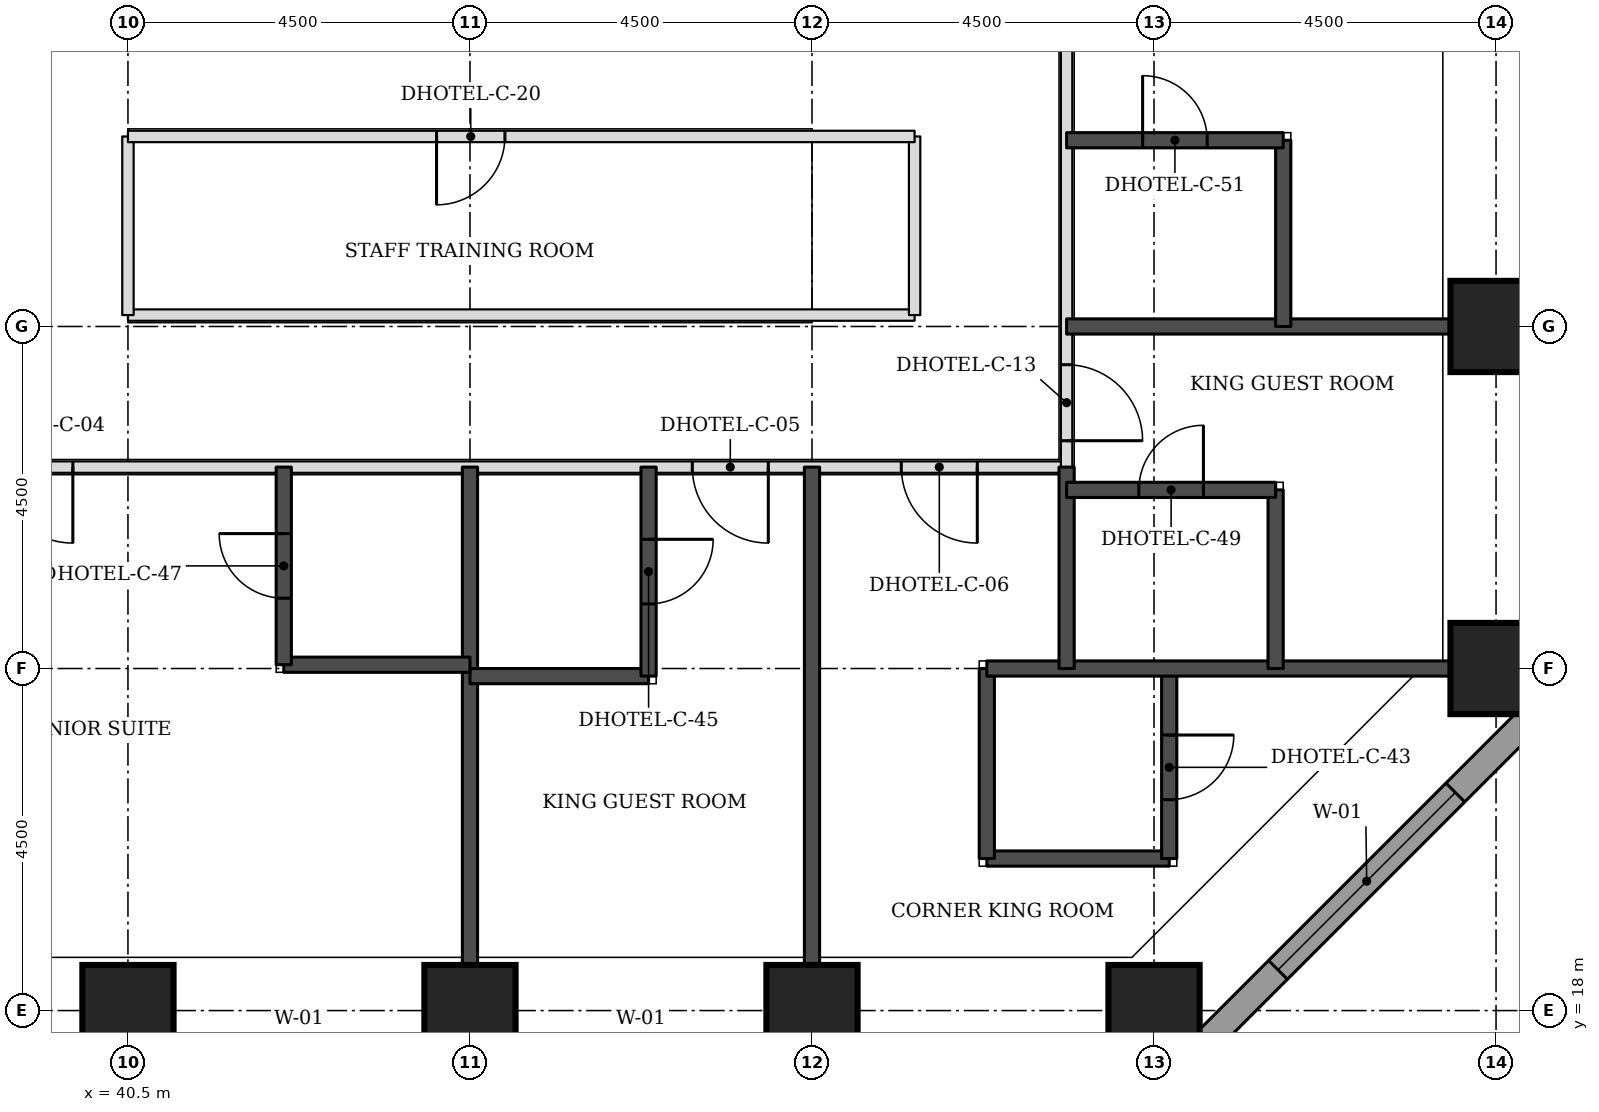
"""IFC4 building model, lengths in metres.
Left out: names, types, materials, properties, quantities, classifications, styles, units other than length and angle.
Written with IfcOpenShell. Run it as: python <this file> out.ifc"""

import sys

from ifc_helpers import new_model, si_unit, direction, frame, frame_2d, origin, origin_2d, place, context, subcontext, project, spatial, rectangle, extrude, element, fill, save


model = new_model("IFC4")
c1 = context("Model", 3, precision=1e-05, world=origin(), true_north=direction((0.0, 1.0)))
c2 = subcontext(c1, "Body", "Model", "MODEL_VIEW")
j1 = project(units=[si_unit("LENGTHUNIT", "METRE"), si_unit("PLANEANGLEUNIT", "RADIAN")], contexts=[c1])
p1 = place(None, origin())
s1 = spatial("IfcSite", under=j1, at=p1, CompositionType="ELEMENT")
p2 = place(p1, origin())
s2 = spatial("IfcBuilding", under=s1, at=p2, CompositionType="ELEMENT")
p3 = place(p2, frame((0.0, 0.0, 56.1)))
s3 = spatial("IfcBuildingStorey", under=s2, at=p3, CompositionType="ELEMENT", Elevation=56.1)
for number, where, z_axis, x_axis in (
    (1, (40.5, 18.0, 0.0), (0.0, 0.0, 1.0), (1.0, 0.0, 0.0)),
    (2, (45.0, 18.0, 0.0), (0.0, 0.0, 1.0), (1.0, 0.0, 0.0)),
    (3, (49.5, 18.0, 0.0), (0.0, 0.0, 1.0), (1.0, 0.0, 0.0)),
    (4, (54.0, 18.0, 0.0), (0.0, 0.0, 1.0), (1.0, 0.0, 0.0)),
    (5, (58.5, 22.5, 0.0), (0.0, 0.0, 1.0), (1.0, 0.0, 0.0)),
    (6, (58.5, 27.0, 0.0), (0.0, 0.0, 1.0), (1.0, 0.0, 0.0)),
):
    element("IfcColumn", number, at=place(p3, frame(where, z_axis=z_axis, x_axis=x_axis)), inside=s3, PredefinedType="COLUMN", context=c2, shape_type="SweptSolid", body=[
        extrude(rectangle(XDim=1.2, YDim=1.2, at=origin_2d()), origin(), (0.0, 0.0, 1.0), 3.3),
    ])
p4 = place(p3, frame((54.27, 17.174, 0.0), z_axis=(0.0, 0.0, 1.0), x_axis=(0.707106781187, 0.707106781187, 0.0)))
e7 = element("IfcWall", 7, at=p4, inside=s3, PredefinedType="STANDARD", context=c2, shape_type="SweptSolid", body=[
    extrude(rectangle(XDim=7.151, YDim=0.35, at=frame_2d((3.576, 0.0))), origin(), (0.0, 0.0, 1.0), 3.055),
])
p5 = place(p4, frame((1.926, 0.0, 0.8)))
e8 = element("IfcOpeningElement", 8, at=p5, cuts=e7, PredefinedType="OPENING", context=c2, shape_type="SweptSolid", body=[
    extrude(rectangle(XDim=3.3, YDim=1.5, at=frame_2d((1.65, 0.75))), frame((0.0, 0.185, 0.0), z_axis=(0.0, -1.0, 0.0), x_axis=(1.0, 0.0, 0.0)), (0.0, 0.0, 1.0), 0.37),
])
p6 = place(p3, frame((19.15, 25.15, 0.0), z_axis=(0.0, 0.0, 1.0), x_axis=(1.0, 0.0, 0.0)))
e9 = element("IfcWall", 9, at=p6, inside=s3, PredefinedType="PARTITIONING", context=c2, shape_type="SweptSolid", body=[
    extrude(rectangle(XDim=33.7, YDim=0.15, at=frame_2d((16.85, 0.0))), origin(), (0.0, 0.0, 1.0), 3.08),
])
p7 = place(p6, frame((4.175, 0.0, 0.0)))
e10 = element("IfcOpeningElement", 10, at=p7, cuts=e9, PredefinedType="OPENING", context=c2, shape_type="SweptSolid", body=[
    extrude(rectangle(XDim=1.0, YDim=2.1, at=frame_2d((0.5, 1.05))), frame((0.0, 0.085, 0.0), z_axis=(0.0, -1.0, 0.0), x_axis=(1.0, 0.0, 0.0)), (0.0, 0.0, 1.0), 0.17),
])
p8 = place(p6, frame((13.325, 0.0, 0.0)))
e11 = element("IfcOpeningElement", 11, at=p8, cuts=e9, PredefinedType="OPENING", context=c2, shape_type="SweptSolid", body=[
    extrude(rectangle(XDim=1.0, YDim=2.1, at=frame_2d((0.5, 1.05))), frame((0.0, 0.085, 0.0), z_axis=(0.0, -1.0, 0.0), x_axis=(1.0, 0.0, 0.0)), (0.0, 0.0, 1.0), 0.17),
])
p9 = place(p6, frame((19.625, 0.0, 0.0)))
e12 = element("IfcOpeningElement", 12, at=p9, cuts=e9, PredefinedType="OPENING", context=c2, shape_type="SweptSolid", body=[
    extrude(rectangle(XDim=1.0, YDim=2.1, at=frame_2d((0.5, 1.05))), frame((0.0, 0.085, 0.0), z_axis=(0.0, -1.0, 0.0), x_axis=(1.0, 0.0, 0.0)), (0.0, 0.0, 1.0), 0.17),
])
p10 = place(p6, frame((28.775, 0.0, 0.0)))
e13 = element("IfcOpeningElement", 13, at=p10, cuts=e9, PredefinedType="OPENING", context=c2, shape_type="SweptSolid", body=[
    extrude(rectangle(XDim=1.0, YDim=2.1, at=frame_2d((0.5, 1.05))), frame((0.0, 0.085, 0.0), z_axis=(0.0, -1.0, 0.0), x_axis=(1.0, 0.0, 0.0)), (0.0, 0.0, 1.0), 0.17),
])
p11 = place(p6, frame((1.175, 0.0, 0.0)))
e14 = element("IfcOpeningElement", 14, at=p11, cuts=e9, PredefinedType="OPENING", context=c2, shape_type="SweptSolid", body=[
    extrude(rectangle(XDim=1.0, YDim=2.1, at=frame_2d((0.5, 1.05))), frame((0.0, 0.085, 0.0), z_axis=(0.0, -1.0, 0.0), x_axis=(1.0, 0.0, 0.0)), (0.0, 0.0, 1.0), 0.17),
])
p12 = place(p6, frame((31.525, 0.0, 0.0)))
e15 = element("IfcOpeningElement", 15, at=p12, cuts=e9, PredefinedType="OPENING", context=c2, shape_type="SweptSolid", body=[
    extrude(rectangle(XDim=1.0, YDim=2.1, at=frame_2d((0.5, 1.05))), frame((0.0, 0.085, 0.0), z_axis=(0.0, -1.0, 0.0), x_axis=(1.0, 0.0, 0.0)), (0.0, 0.0, 1.0), 0.17),
])
p13 = place(p3, frame((52.85, 25.15, 0.0), z_axis=(0.0, 0.0, 1.0), x_axis=(0.0, 1.0, 0.0)))
e16 = element("IfcWall", 16, at=p13, inside=s3, PredefinedType="PARTITIONING", context=c2, shape_type="SweptSolid", body=[
    extrude(rectangle(XDim=22.35, YDim=0.15, at=frame_2d((11.175, 0.0))), origin(), (0.0, 0.0, 1.0), 3.08),
])
p14 = place(p13, frame((0.347, 0.0, 0.0)))
e17 = element("IfcOpeningElement", 17, at=p14, cuts=e16, PredefinedType="OPENING", context=c2, shape_type="SweptSolid", body=[
    extrude(rectangle(XDim=1.0, YDim=2.1, at=frame_2d((0.5, 1.05))), frame((0.0, 0.085, 0.0), z_axis=(0.0, -1.0, 0.0), x_axis=(1.0, 0.0, 0.0)), (0.0, 0.0, 1.0), 0.17),
])
p15 = place(p13, frame((7.075, 0.0, 0.0)))
e18 = element("IfcOpeningElement", 18, at=p15, cuts=e16, PredefinedType="OPENING", context=c2, shape_type="SweptSolid", body=[
    extrude(rectangle(XDim=1.0, YDim=2.1, at=frame_2d((0.5, 1.05))), frame((0.0, 0.085, 0.0), z_axis=(0.0, -1.0, 0.0), x_axis=(1.0, 0.0, 0.0)), (0.0, 0.0, 1.0), 0.17),
])
p16 = place(p13, frame((11.425, 0.0, 0.0)))
e19 = element("IfcOpeningElement", 19, at=p16, cuts=e16, PredefinedType="OPENING", context=c2, shape_type="SweptSolid", body=[
    extrude(rectangle(XDim=1.0, YDim=2.1, at=frame_2d((0.5, 1.05))), frame((0.0, 0.085, 0.0), z_axis=(0.0, -1.0, 0.0), x_axis=(1.0, 0.0, 0.0)), (0.0, 0.0, 1.0), 0.17),
])
p17 = place(p13, frame((17.15, 0.0, 0.0)))
e20 = element("IfcOpeningElement", 20, at=p17, cuts=e16, PredefinedType="OPENING", context=c2, shape_type="SweptSolid", body=[
    extrude(rectangle(XDim=0.9, YDim=2.1, at=frame_2d((0.45, 1.05))), frame((0.0, 0.085, 0.0), z_axis=(0.0, -1.0, 0.0), x_axis=(1.0, 0.0, 0.0)), (0.0, 0.0, 1.0), 0.17),
])
p18 = place(p3, frame((40.5, 27.15, 0.0), z_axis=(0.0, 0.0, 1.0), x_axis=(1.0, 0.0, 0.0)))
e21 = element("IfcWall", 21, at=p18, inside=s3, PredefinedType="PARTITIONING", context=c2, shape_type="SweptSolid", body=[
    extrude(rectangle(XDim=10.35, YDim=0.15, at=frame_2d((5.175, 0.0))), origin(), (0.0, 0.0, 1.0), 3.08),
])
for number, where, z_axis, x_axis in (
    (22, (40.5, 27.15, 0.0), (0.0, 0.0, 1.0), (0.0, 1.0, 0.0)),
    (23, (50.85, 27.15, 0.0), (0.0, 0.0, 1.0), (0.0, 1.0, 0.0)),
):
    element("IfcWall", number, at=place(p3, frame(where, z_axis=z_axis, x_axis=x_axis)), inside=s3, PredefinedType="PARTITIONING", context=c2, shape_type="SweptSolid", body=[
        extrude(rectangle(XDim=2.35, YDim=0.15, at=frame_2d((1.175, 0.0))), origin(), (0.0, 0.0, 1.0), 3.08),
    ])
p19 = place(p3, frame((40.5, 29.5, 0.0), z_axis=(0.0, 0.0, 1.0), x_axis=(1.0, 0.0, 0.0)))
e24 = element("IfcWall", 24, at=p19, inside=s3, PredefinedType="PARTITIONING", context=c2, shape_type="SweptSolid", body=[
    extrude(rectangle(XDim=10.35, YDim=0.15, at=frame_2d((5.175, 0.0))), origin(), (0.0, 0.0, 1.0), 3.08),
])
p20 = place(p19, frame((4.06, 0.0, 0.0)))
e25 = element("IfcOpeningElement", 25, at=p20, cuts=e24, PredefinedType="OPENING", context=c2, shape_type="SweptSolid", body=[
    extrude(rectangle(XDim=0.9, YDim=2.1, at=frame_2d((0.45, 1.05))), frame((0.0, 0.085, 0.0), z_axis=(0.0, -1.0, 0.0), x_axis=(1.0, 0.0, 0.0)), (0.0, 0.0, 1.0), 0.17),
])
for number, where, z_axis, x_axis in (
    (26, (45.0, 18.6, 0.0), (0.0, 0.0, 1.0), (0.0, 1.0, 0.0)),
    (27, (49.5, 18.6, 0.0), (0.0, 0.0, 1.0), (0.0, 1.0, 0.0)),
):
    element("IfcWall", number, at=place(p3, frame(where, z_axis=z_axis, x_axis=x_axis)), inside=s3, PredefinedType="SOLIDWALL", context=c2, shape_type="SweptSolid", body=[
        extrude(rectangle(XDim=6.55, YDim=0.2, at=frame_2d((3.275, 0.0))), origin(), (0.0, 0.0, 1.0), 3.08),
    ])
p21 = place(p3, frame((51.8, 20.0, 0.0), z_axis=(0.0, 0.0, 1.0), x_axis=(1.0, 0.0, 0.0)))
e28 = element("IfcWall", 28, at=p21, inside=s3, PredefinedType="SOLIDWALL", context=c2, shape_type="SweptSolid", body=[
    extrude(rectangle(XDim=2.4, YDim=0.2, at=frame_2d((1.2, 0.0))), origin(), (0.0, 0.0, 1.0), 3.08),
])
p22 = place(p3, frame((51.8, 20.0, 0.0), z_axis=(0.0, 0.0, 1.0), x_axis=(0.0, 1.0, 0.0)))
e29 = element("IfcWall", 29, at=p22, inside=s3, PredefinedType="SOLIDWALL", context=c2, shape_type="SweptSolid", body=[
    extrude(rectangle(XDim=2.5, YDim=0.2, at=frame_2d((1.25, 0.0))), origin(), (0.0, 0.0, 1.0), 3.08),
])
p23 = place(p3, frame((54.2, 20.0, 0.0), z_axis=(0.0, 0.0, 1.0), x_axis=(0.0, 1.0, 0.0)))
e30 = element("IfcWall", 30, at=p23, inside=s3, PredefinedType="SOLIDWALL", context=c2, shape_type="SweptSolid", body=[
    extrude(rectangle(XDim=2.5, YDim=0.2, at=frame_2d((1.25, 0.0))), origin(), (0.0, 0.0, 1.0), 3.08),
])
p24 = place(p23, frame((0.775, 0.0, 0.0)))
e31 = element("IfcOpeningElement", 31, at=p24, cuts=e30, PredefinedType="OPENING", context=c2, shape_type="SweptSolid", body=[
    extrude(rectangle(XDim=0.85, YDim=2.1, at=frame_2d((0.425, 1.05))), frame((0.0, 0.11, 0.0), z_axis=(0.0, -1.0, 0.0), x_axis=(1.0, 0.0, 0.0)), (0.0, 0.0, 1.0), 0.22),
])
p25 = place(p3, frame((45.0, 22.4, 0.0), z_axis=(0.0, 0.0, 1.0), x_axis=(1.0, 0.0, 0.0)))
e32 = element("IfcWall", 32, at=p25, inside=s3, PredefinedType="SOLIDWALL", context=c2, shape_type="SweptSolid", body=[
    extrude(rectangle(XDim=2.35, YDim=0.2, at=frame_2d((1.175, 0.0))), origin(), (0.0, 0.0, 1.0), 3.08),
])
p26 = place(p3, frame((47.35, 22.4, 0.0), z_axis=(0.0, 0.0, 1.0), x_axis=(0.0, 1.0, 0.0)))
e33 = element("IfcWall", 33, at=p26, inside=s3, PredefinedType="SOLIDWALL", context=c2, shape_type="SweptSolid", body=[
    extrude(rectangle(XDim=2.75, YDim=0.2, at=frame_2d((1.375, 0.0))), origin(), (0.0, 0.0, 1.0), 3.08),
])
p27 = place(p26, frame((0.95, 0.0, 0.0)))
e34 = element("IfcOpeningElement", 34, at=p27, cuts=e33, PredefinedType="OPENING", context=c2, shape_type="SweptSolid", body=[
    extrude(rectangle(XDim=0.85, YDim=2.1, at=frame_2d((0.425, 1.05))), frame((0.0, 0.11, 0.0), z_axis=(0.0, -1.0, 0.0), x_axis=(1.0, 0.0, 0.0)), (0.0, 0.0, 1.0), 0.22),
])
p28 = place(p3, frame((51.8, 22.5, 0.0), z_axis=(0.0, 0.0, 1.0), x_axis=(1.0, 0.0, 0.0)))
e35 = element("IfcWall", 35, at=p28, inside=s3, PredefinedType="SOLIDWALL", context=c2, shape_type="SweptSolid", body=[
    extrude(rectangle(XDim=6.1, YDim=0.2, at=frame_2d((3.05, 0.0))), origin(), (0.0, 0.0, 1.0), 3.08),
])
p29 = place(p3, frame((52.85, 22.5, 0.0), z_axis=(0.0, 0.0, 1.0), x_axis=(0.0, 1.0, 0.0)))
e36 = element("IfcWall", 36, at=p29, inside=s3, PredefinedType="SOLIDWALL", context=c2, shape_type="SweptSolid", body=[
    extrude(rectangle(XDim=2.65, YDim=0.2, at=frame_2d((1.325, 0.0))), origin(), (0.0, 0.0, 1.0), 3.08),
])
p30 = place(p3, frame((55.6, 22.5, 0.0), z_axis=(0.0, 0.0, 1.0), x_axis=(0.0, 1.0, 0.0)))
e37 = element("IfcWall", 37, at=p30, inside=s3, PredefinedType="SOLIDWALL", context=c2, shape_type="SweptSolid", body=[
    extrude(rectangle(XDim=2.35, YDim=0.2, at=frame_2d((1.175, 0.0))), origin(), (0.0, 0.0, 1.0), 3.08),
])
p31 = place(p3, frame((42.55, 22.55, 0.0), z_axis=(0.0, 0.0, 1.0), x_axis=(1.0, 0.0, 0.0)))
e38 = element("IfcWall", 38, at=p31, inside=s3, PredefinedType="SOLIDWALL", context=c2, shape_type="SweptSolid", body=[
    extrude(rectangle(XDim=2.45, YDim=0.2, at=frame_2d((1.225, 0.0))), origin(), (0.0, 0.0, 1.0), 3.08),
])
p32 = place(p3, frame((42.55, 22.55, 0.0), z_axis=(0.0, 0.0, 1.0), x_axis=(0.0, 1.0, 0.0)))
e39 = element("IfcWall", 39, at=p32, inside=s3, PredefinedType="SOLIDWALL", context=c2, shape_type="SweptSolid", body=[
    extrude(rectangle(XDim=2.6, YDim=0.2, at=frame_2d((1.3, 0.0))), origin(), (0.0, 0.0, 1.0), 3.08),
])
p33 = place(p32, frame((0.875, 0.0, 0.0)))
e40 = element("IfcOpeningElement", 40, at=p33, cuts=e39, PredefinedType="OPENING", context=c2, shape_type="SweptSolid", body=[
    extrude(rectangle(XDim=0.85, YDim=2.1, at=frame_2d((0.425, 1.05))), frame((0.0, 0.11, 0.0), z_axis=(0.0, -1.0, 0.0), x_axis=(1.0, 0.0, 0.0)), (0.0, 0.0, 1.0), 0.22),
])
p34 = place(p3, frame((52.85, 24.85, 0.0), z_axis=(0.0, 0.0, 1.0), x_axis=(1.0, 0.0, 0.0)))
e41 = element("IfcWall", 41, at=p34, inside=s3, PredefinedType="SOLIDWALL", context=c2, shape_type="SweptSolid", body=[
    extrude(rectangle(XDim=2.75, YDim=0.2, at=frame_2d((1.375, 0.0))), origin(), (0.0, 0.0, 1.0), 3.08),
])
p35 = place(p34, frame((0.95, 0.0, 0.0)))
e42 = element("IfcOpeningElement", 42, at=p35, cuts=e41, PredefinedType="OPENING", context=c2, shape_type="SweptSolid", body=[
    extrude(rectangle(XDim=0.85, YDim=2.1, at=frame_2d((0.425, 1.05))), frame((0.0, 0.11, 0.0), z_axis=(0.0, -1.0, 0.0), x_axis=(1.0, 0.0, 0.0)), (0.0, 0.0, 1.0), 0.22),
])
p36 = place(p3, frame((52.85, 27.0, 0.0), z_axis=(0.0, 0.0, 1.0), x_axis=(1.0, 0.0, 0.0)))
e43 = element("IfcWall", 43, at=p36, inside=s3, PredefinedType="SOLIDWALL", context=c2, shape_type="SweptSolid", body=[
    extrude(rectangle(XDim=5.05, YDim=0.2, at=frame_2d((2.525, 0.0))), origin(), (0.0, 0.0, 1.0), 3.08),
])
p37 = place(p3, frame((55.7, 27.0, 0.0), z_axis=(0.0, 0.0, 1.0), x_axis=(0.0, 1.0, 0.0)))
e44 = element("IfcWall", 44, at=p37, inside=s3, PredefinedType="SOLIDWALL", context=c2, shape_type="SweptSolid", body=[
    extrude(rectangle(XDim=2.45, YDim=0.2, at=frame_2d((1.225, 0.0))), origin(), (0.0, 0.0, 1.0), 3.08),
])
p38 = place(p3, frame((52.85, 29.45, 0.0), z_axis=(0.0, 0.0, 1.0), x_axis=(1.0, 0.0, 0.0)))
e45 = element("IfcWall", 45, at=p38, inside=s3, PredefinedType="SOLIDWALL", context=c2, shape_type="SweptSolid", body=[
    extrude(rectangle(XDim=2.85, YDim=0.2, at=frame_2d((1.425, 0.0))), origin(), (0.0, 0.0, 1.0), 3.08),
])
p39 = place(p38, frame((1.0, 0.0, 0.0)))
e46 = element("IfcOpeningElement", 46, at=p39, cuts=e45, PredefinedType="OPENING", context=c2, shape_type="SweptSolid", body=[
    extrude(rectangle(XDim=0.85, YDim=2.1, at=frame_2d((0.425, 1.05))), frame((0.0, 0.11, 0.0), z_axis=(0.0, -1.0, 0.0), x_axis=(1.0, 0.0, 0.0)), (0.0, 0.0, 1.0), 0.22),
])
p40 = place(p5, origin())
e47 = element("IfcWindow", 47, at=p40, inside=s3, PartitioningType="SINGLE_PANEL", PredefinedType="WINDOW", context=c2, shape_type="SweptSolid", body=[
    extrude(rectangle(XDim=3.3, YDim=1.5, at=frame_2d((1.65, 0.75))), frame((0.0, 0.085, 0.0), z_axis=(0.0, -1.0, 0.0), x_axis=(1.0, 0.0, 0.0)), (0.0, 0.0, 1.0), 0.06),
])
fill(e8, e47)
p41 = place(p9, frame((1.0, 0.0, 0.0), z_axis=(0.0, 0.0, 1.0), x_axis=(-1.0, 0.0, 0.0)))
e48 = element("IfcDoor", 48, at=p41, inside=s3, OperationType="SINGLE_SWING_LEFT", PredefinedType="DOOR", context=c2, shape_type="SweptSolid", body=[
    extrude(rectangle(XDim=1.0, YDim=2.1, at=frame_2d((0.5, 1.05))), frame((0.0, 0.025, 0.0), z_axis=(0.0, -1.0, 0.0), x_axis=(1.0, 0.0, 0.0)), (0.0, 0.0, 1.0), 0.05),
])
fill(e12, e48)
p42 = place(p33, origin())
e49 = element("IfcDoor", 49, at=p42, inside=s3, OperationType="SINGLE_SWING_RIGHT", PredefinedType="DOOR", context=c2, shape_type="SweptSolid", body=[
    extrude(rectangle(XDim=0.85, YDim=2.1, at=frame_2d((0.425, 1.05))), frame((0.0, 0.025, 0.0), z_axis=(0.0, -1.0, 0.0), x_axis=(1.0, 0.0, 0.0)), (0.0, 0.0, 1.0), 0.05),
])
fill(e40, e49)
p43 = place(p10, frame((1.0, 0.0, 0.0), z_axis=(0.0, 0.0, 1.0), x_axis=(-1.0, 0.0, 0.0)))
e50 = element("IfcDoor", 50, at=p43, inside=s3, OperationType="SINGLE_SWING_LEFT", PredefinedType="DOOR", context=c2, shape_type="SweptSolid", body=[
    extrude(rectangle(XDim=1.0, YDim=2.1, at=frame_2d((0.5, 1.05))), frame((0.0, 0.025, 0.0), z_axis=(0.0, -1.0, 0.0), x_axis=(1.0, 0.0, 0.0)), (0.0, 0.0, 1.0), 0.05),
])
fill(e13, e50)
p44 = place(p27, frame((0.85, 0.0, 0.0), z_axis=(0.0, 0.0, 1.0), x_axis=(-1.0, 0.0, 0.0)))
e51 = element("IfcDoor", 51, at=p44, inside=s3, OperationType="SINGLE_SWING_LEFT", PredefinedType="DOOR", context=c2, shape_type="SweptSolid", body=[
    extrude(rectangle(XDim=0.85, YDim=2.1, at=frame_2d((0.425, 1.05))), frame((0.0, 0.025, 0.0), z_axis=(0.0, -1.0, 0.0), x_axis=(1.0, 0.0, 0.0)), (0.0, 0.0, 1.0), 0.05),
])
fill(e34, e51)
p45 = place(p14, frame((1.0, 0.0, 0.0), z_axis=(0.0, 0.0, 1.0), x_axis=(-1.0, 0.0, 0.0)))
e52 = element("IfcDoor", 52, at=p45, inside=s3, OperationType="SINGLE_SWING_RIGHT", PredefinedType="DOOR", context=c2, shape_type="SweptSolid", body=[
    extrude(rectangle(XDim=1.0, YDim=2.1, at=frame_2d((0.5, 1.05))), frame((0.0, 0.025, 0.0), z_axis=(0.0, -1.0, 0.0), x_axis=(1.0, 0.0, 0.0)), (0.0, 0.0, 1.0), 0.05),
])
fill(e17, e52)
p46 = place(p35, origin())
e53 = element("IfcDoor", 53, at=p46, inside=s3, OperationType="SINGLE_SWING_RIGHT", PredefinedType="DOOR", context=c2, shape_type="SweptSolid", body=[
    extrude(rectangle(XDim=0.85, YDim=2.1, at=frame_2d((0.425, 1.05))), frame((0.0, 0.025, 0.0), z_axis=(0.0, -1.0, 0.0), x_axis=(1.0, 0.0, 0.0)), (0.0, 0.0, 1.0), 0.05),
])
fill(e42, e53)
p47 = place(p39, origin())
e54 = element("IfcDoor", 54, at=p47, inside=s3, OperationType="SINGLE_SWING_LEFT", PredefinedType="DOOR", context=c2, shape_type="SweptSolid", body=[
    extrude(rectangle(XDim=0.85, YDim=2.1, at=frame_2d((0.425, 1.05))), frame((0.0, 0.025, 0.0), z_axis=(0.0, -1.0, 0.0), x_axis=(1.0, 0.0, 0.0)), (0.0, 0.0, 1.0), 0.05),
])
fill(e46, e54)
p48 = place(p12, frame((1.0, 0.0, 0.0), z_axis=(0.0, 0.0, 1.0), x_axis=(-1.0, 0.0, 0.0)))
e55 = element("IfcDoor", 55, at=p48, inside=s3, OperationType="SINGLE_SWING_LEFT", PredefinedType="DOOR", context=c2, shape_type="SweptSolid", body=[
    extrude(rectangle(XDim=1.0, YDim=2.1, at=frame_2d((0.5, 1.05))), frame((0.0, 0.025, 0.0), z_axis=(0.0, -1.0, 0.0), x_axis=(1.0, 0.0, 0.0)), (0.0, 0.0, 1.0), 0.05),
])
fill(e15, e55)
p49 = place(p24, frame((0.85, 0.0, 0.0), z_axis=(0.0, 0.0, 1.0), x_axis=(-1.0, 0.0, 0.0)))
e56 = element("IfcDoor", 56, at=p49, inside=s3, OperationType="SINGLE_SWING_LEFT", PredefinedType="DOOR", context=c2, shape_type="SweptSolid", body=[
    extrude(rectangle(XDim=0.85, YDim=2.1, at=frame_2d((0.425, 1.05))), frame((0.0, 0.025, 0.0), z_axis=(0.0, -1.0, 0.0), x_axis=(1.0, 0.0, 0.0)), (0.0, 0.0, 1.0), 0.05),
])
fill(e31, e56)
p50 = place(p20, frame((0.9, 0.0, 0.0), z_axis=(0.0, 0.0, 1.0), x_axis=(-1.0, 0.0, 0.0)))
e57 = element("IfcDoor", 57, at=p50, inside=s3, OperationType="SINGLE_SWING_RIGHT", PredefinedType="DOOR", context=c2, shape_type="SweptSolid", body=[
    extrude(rectangle(XDim=0.9, YDim=2.1, at=frame_2d((0.45, 1.05))), frame((0.0, 0.025, 0.0), z_axis=(0.0, -1.0, 0.0), x_axis=(1.0, 0.0, 0.0)), (0.0, 0.0, 1.0), 0.05),
])
fill(e25, e57)
save(model, sys.argv[1])
